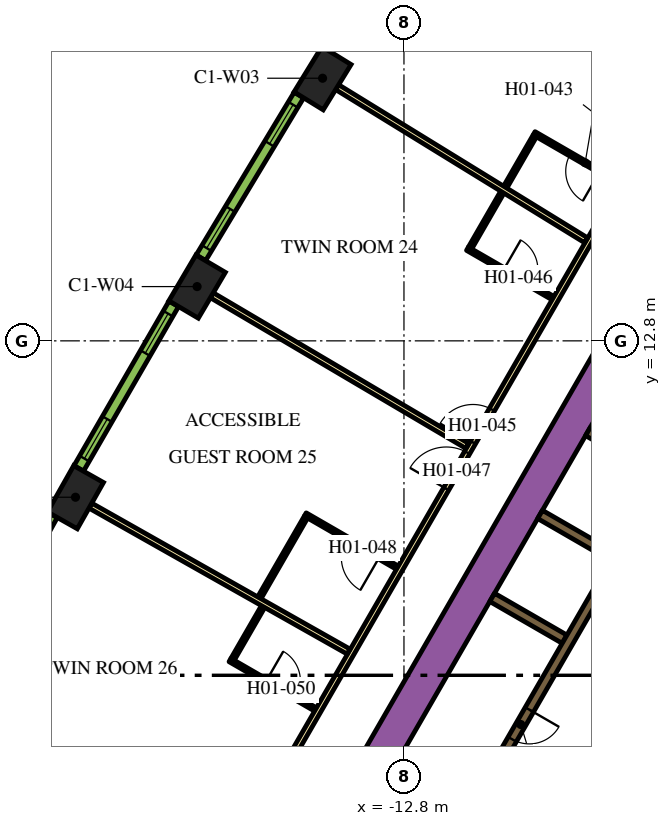
"""IFC4 building model, lengths in metres.
Left out: names, types, materials, properties, quantities, classifications, styles, units other than length and angle.
Written with IfcOpenShell. Run it as: python <this file> out.ifc"""

import sys

from ifc_helpers import new_model, si_unit, direction, frame, frame_2d, origin, origin_2d, place, context, subcontext, project, spatial, rectangle, extrude, element, fill, save


model = new_model("IFC4")
c1 = context("Model", 3, precision=1e-05, world=origin(), true_north=direction((0.0, 1.0)))
c2 = subcontext(c1, "Body", "Model", "MODEL_VIEW")
j1 = project(units=[si_unit("LENGTHUNIT", "METRE"), si_unit("PLANEANGLEUNIT", "RADIAN")], contexts=[c1])
p1 = place(None, origin())
s1 = spatial("IfcSite", under=j1, at=p1, CompositionType="ELEMENT")
p2 = place(p1, origin())
s2 = spatial("IfcBuilding", under=s1, at=p2, CompositionType="ELEMENT")
p3 = place(p2, frame((0.0, 0.0, 35.4)))
s3 = spatial("IfcBuildingStorey", under=s2, at=p3, CompositionType="ELEMENT", Elevation=35.4)
for number, where, z_axis, x_axis in (
    (1, (-14.942, 19.71, 0.0), (0.0, 0.0, 1.0), (-0.524, -0.852, 0.0)),
    (2, (-18.243, 14.228, 0.0), (0.0, 0.0, 1.0), (-0.508, -0.861, 0.0)),
    (3, (-21.443, 8.685, 0.0), (0.0, 0.0, 1.0), (-0.492, -0.871, 0.0)),
):
    element("IfcColumn", number, at=place(p3, frame(where, z_axis=z_axis, x_axis=x_axis)), inside=s3, PredefinedType="COLUMN", context=c2, shape_type="SweptSolid", body=[
        extrude(rectangle(XDim=1.4, YDim=0.9, at=origin_2d()), origin(), (0.0, 0.0, 1.0), 3.9),
    ])
p4 = place(p3, frame((-15.36, -1.503, 0.0), z_axis=(0.0, 0.0, 1.0), x_axis=(0.50000389221, 0.866023156604, 0.0)))
e4 = element("IfcWall", 4, at=p4, inside=s3, PredefinedType="SOLIDWALL", context=c2, shape_type="SweptSolid", body=[
    extrude(rectangle(XDim=21.0, YDim=0.9, at=frame_2d((10.5, 0.0))), origin(), (0.0, 0.0, 1.0), 3.9),
])
p5 = place(p3, frame((-8.06, -1.311, 0.0), z_axis=(0.0, 0.0, 1.0), x_axis=(0.50000273126, 0.866023826885, 0.0)))
e5 = element("IfcWall", 5, at=p5, inside=s3, PredefinedType="SOLIDWALL", context=c2, shape_type="SweptSolid", body=[
    extrude(rectangle(XDim=10.33, YDim=0.25, at=frame_2d((5.165, 0.0))), origin(), (0.0, 0.0, 1.0), 3.9),
])
for number, where, z_axis, x_axis in (
    (6, (-8.574, 4.95, 0.0), (0.0, 0.0, 1.0), (-0.866, 0.5, 0.0)),
    (7, (-7.314, 7.132, 0.0), (0.0, 0.0, 1.0), (-0.866, 0.5, 0.0)),
):
    element("IfcWall", number, at=place(p3, frame(where, z_axis=z_axis, x_axis=x_axis)), inside=s3, PredefinedType="SOLIDWALL", context=c2, shape_type="SweptSolid", body=[
        extrude(rectangle(XDim=2.2, YDim=0.25, at=frame_2d((1.1, 0.0))), origin(), (0.0, 0.0, 1.0), 3.9),
    ])
p6 = place(p3, frame((-7.959, 10.415, 0.0), z_axis=(0.0, 0.0, 1.0), x_axis=(0.866020958405, -0.500007699544, 0.0)))
e8 = element("IfcWall", 8, at=p6, inside=s3, PredefinedType="SOLIDWALL", context=c2, shape_type="SweptSolid", body=[
    extrude(rectangle(XDim=4.1, YDim=0.25, at=frame_2d((2.05, 0.0))), origin(), (0.0, 0.0, 1.0), 3.9),
])
p7 = place(p3, frame((-6.008, 9.144, 0.0), z_axis=(0.0, 0.0, 1.0), x_axis=(-0.500006956611, -0.866021387346, 0.0)))
e9 = element("IfcWall", 9, at=p7, inside=s3, PredefinedType="SOLIDWALL", context=c2, shape_type="SweptSolid", body=[
    extrude(rectangle(XDim=9.83, YDim=0.25, at=frame_2d((4.915, 0.0))), origin(), (0.0, 0.0, 1.0), 3.9),
])
p8 = place(p7, frame((6.985, 0.0, 0.0)))
e10 = element("IfcOpeningElement", 10, at=p8, cuts=e9, PredefinedType="OPENING", context=c2, shape_type="SweptSolid", body=[
    extrude(rectangle(XDim=0.9, YDim=2.1, at=frame_2d((0.45, 1.05))), frame((0.0, 0.135, 0.0), z_axis=(0.0, -1.0, 0.0), x_axis=(1.0, 0.0, 0.0)), (0.0, 0.0, 1.0), 0.27),
])
p9 = place(p3, frame((-19.081, -3.9, 0.0), z_axis=(0.0, 0.0, 1.0), x_axis=(0.499998313975, 0.866026377209, 0.0)))
e11 = element("IfcWall", 11, at=p9, inside=s3, PredefinedType="PARTITIONING", context=c2, shape_type="SweptSolid", body=[
    extrude(rectangle(XDim=25.766, YDim=0.15, at=frame_2d((12.883, 0.0))), origin(), (0.0, 0.0, 1.0), 2.75),
])
p10 = place(p9, frame((24.586, 0.0, 0.0)))
e12 = element("IfcOpeningElement", 12, at=p10, cuts=e11, PredefinedType="OPENING", context=c2, shape_type="SweptSolid", body=[
    extrude(rectangle(XDim=1.0, YDim=2.1, at=frame_2d((0.5, 1.05))), frame((0.0, 0.085, 0.0), z_axis=(0.0, -1.0, 0.0), x_axis=(1.0, 0.0, 0.0)), (0.0, 0.0, 1.0), 0.17),
])
p11 = place(p9, frame((16.196, 0.0, 0.0)))
e13 = element("IfcOpeningElement", 13, at=p11, cuts=e11, PredefinedType="OPENING", context=c2, shape_type="SweptSolid", body=[
    extrude(rectangle(XDim=1.0, YDim=2.1, at=frame_2d((0.5, 1.05))), frame((0.0, 0.085, 0.0), z_axis=(0.0, -1.0, 0.0), x_axis=(1.0, 0.0, 0.0)), (0.0, 0.0, 1.0), 0.17),
])
p12 = place(p9, frame((14.789, 0.0, 0.0)))
e14 = element("IfcOpeningElement", 14, at=p12, cuts=e11, PredefinedType="OPENING", context=c2, shape_type="SweptSolid", body=[
    extrude(rectangle(XDim=1.1, YDim=2.1, at=frame_2d((0.55, 1.05))), frame((0.0, 0.085, 0.0), z_axis=(0.0, -1.0, 0.0), x_axis=(1.0, 0.0, 0.0)), (0.0, 0.0, 1.0), 0.17),
])
p13 = place(p9, frame((3.698, 0.0, 0.0)))
e15 = element("IfcOpeningElement", 15, at=p13, cuts=e11, PredefinedType="OPENING", context=c2, shape_type="SweptSolid", body=[
    extrude(rectangle(XDim=1.0, YDim=2.1, at=frame_2d((0.5, 1.05))), frame((0.0, 0.085, 0.0), z_axis=(0.0, -1.0, 0.0), x_axis=(1.0, 0.0, 0.0)), (0.0, 0.0, 1.0), 0.17),
])
p14 = place(p9, frame((1.531, 0.0, 0.0)))
e16 = element("IfcOpeningElement", 16, at=p14, cuts=e11, PredefinedType="OPENING", context=c2, shape_type="SweptSolid", body=[
    extrude(rectangle(XDim=0.9, YDim=2.1, at=frame_2d((0.45, 1.05))), frame((0.0, 0.085, 0.0), z_axis=(0.0, -1.0, 0.0), x_axis=(1.0, 0.0, 0.0)), (0.0, 0.0, 1.0), 0.17),
])
p15 = place(p3, frame((-24.145, 2.871, 0.0), z_axis=(0.0, 0.0, 1.0), x_axis=(0.879551725039, -0.475803281809, 0.0)))
e17 = element("IfcWall", 17, at=p15, inside=s3, PredefinedType="PARTITIONING", context=c2, shape_type="SweptSolid", body=[
    extrude(rectangle(XDim=7.688, YDim=0.15, at=frame_2d((3.844, 0.0))), origin(), (0.0, 0.0, 1.0), 2.75),
])
p16 = place(p3, frame((-21.052, 8.464, 0.0), z_axis=(0.0, 0.0, 1.0), x_axis=(0.87059371954, -0.492002617368, 0.0)))
e18 = element("IfcWall", 18, at=p16, inside=s3, PredefinedType="PARTITIONING", context=c2, shape_type="SweptSolid", body=[
    extrude(rectangle(XDim=7.803, YDim=0.15, at=frame_2d((3.902, 0.0))), origin(), (0.0, 0.0, 1.0), 2.75),
])
p17 = place(p3, frame((-17.856, 13.999, 0.0), z_axis=(0.0, 0.0, 1.0), x_axis=(0.861371519381, -0.507975497047, 0.0)))
e19 = element("IfcWall", 19, at=p17, inside=s3, PredefinedType="PARTITIONING", context=c2, shape_type="SweptSolid", body=[
    extrude(rectangle(XDim=7.804, YDim=0.15, at=frame_2d((3.902, 0.0))), origin(), (0.0, 0.0, 1.0), 2.75),
])
p18 = place(p3, frame((-14.558, 19.475, 0.0), z_axis=(0.0, 0.0, 1.0), x_axis=(0.851829455142, -0.523819223925, 0.0)))
e20 = element("IfcWall", 20, at=p18, inside=s3, PredefinedType="PARTITIONING", context=c2, shape_type="SweptSolid", body=[
    extrude(rectangle(XDim=7.688, YDim=0.15, at=frame_2d((3.844, 0.0))), origin(), (0.0, 0.0, 1.0), 2.75),
])
p19 = place(p3, frame((-11.16, 24.888, 0.0), z_axis=(0.0, 0.0, 1.0), x_axis=(0.84199813156, -0.539480441211, 0.0)))
e21 = element("IfcWall", 21, at=p19, inside=s3, PredefinedType="PARTITIONING", context=c2, shape_type="SweptSolid", body=[
    extrude(rectangle(XDim=11.638, YDim=0.15, at=frame_2d((5.819, 0.0))), origin(), (0.0, 0.0, 1.0), 2.75),
])
p20 = place(p3, frame((-7.124, 16.961, 0.0), z_axis=(0.0, 0.0, 1.0), x_axis=(-0.866021400173, 0.500006934395, 0.0)))
e22 = element("IfcWall", 22, at=p20, inside=s3, PredefinedType="PARTITIONING", context=c2, shape_type="SweptSolid", body=[
    extrude(rectangle(XDim=2.6, YDim=0.1, at=frame_2d((1.3, 0.0))), origin(), (0.0, 0.0, 1.0), 2.75),
])
p21 = place(p20, frame((0.6, 0.0, 0.0)))
e23 = element("IfcOpeningElement", 23, at=p21, cuts=e22, PredefinedType="OPENING", context=c2, shape_type="SweptSolid", body=[
    extrude(rectangle(XDim=0.9, YDim=2.1, at=frame_2d((0.45, 1.05))), frame((0.0, 0.06, 0.0), z_axis=(0.0, -1.0, 0.0), x_axis=(1.0, 0.0, 0.0)), (0.0, 0.0, 1.0), 0.12),
])
p22 = place(p3, frame((-9.362, 18.184, 0.0), z_axis=(0.0, 0.0, 1.0), x_axis=(-0.499992328818, -0.866029832698, 0.0)))
e24 = element("IfcWall", 24, at=p22, inside=s3, PredefinedType="PARTITIONING", context=c2, shape_type="SweptSolid", body=[
    extrude(rectangle(XDim=1.54, YDim=0.1, at=frame_2d((0.77, 0.0))), origin(), (0.0, 0.0, 1.0), 2.75),
])
p23 = place(p3, frame((-11.129, 15.224, 0.0), z_axis=(0.0, 0.0, 1.0), x_axis=(0.866021400173, -0.500006934395, 0.0)))
e25 = element("IfcWall", 25, at=p23, inside=s3, PredefinedType="PARTITIONING", context=c2, shape_type="SweptSolid", body=[
    extrude(rectangle(XDim=2.6, YDim=0.1, at=frame_2d((1.3, 0.0))), origin(), (0.0, 0.0, 1.0), 2.75),
])
p24 = place(p23, frame((1.1, 0.0, 0.0)))
e26 = element("IfcOpeningElement", 26, at=p24, cuts=e25, PredefinedType="OPENING", context=c2, shape_type="SweptSolid", body=[
    extrude(rectangle(XDim=0.9, YDim=2.1, at=frame_2d((0.45, 1.05))), frame((0.0, 0.06, 0.0), z_axis=(0.0, -1.0, 0.0), x_axis=(1.0, 0.0, 0.0)), (0.0, 0.0, 1.0), 0.12),
])
p25 = place(p3, frame((-11.061, 15.242, 0.0), z_axis=(0.0, 0.0, 1.0), x_axis=(0.499976720371, 0.866038843867, 0.0)))
e27 = element("IfcWall", 27, at=p25, inside=s3, PredefinedType="PARTITIONING", context=c2, shape_type="SweptSolid", body=[
    extrude(rectangle(XDim=1.69, YDim=0.1, at=frame_2d((0.845, 0.0))), origin(), (0.0, 0.0, 1.0), 2.75),
])
p26 = place(p3, frame((-12.972, 6.831, 0.0), z_axis=(0.0, 0.0, 1.0), x_axis=(-0.866018616679, 0.500011755427, 0.0)))
e28 = element("IfcWall", 28, at=p26, inside=s3, PredefinedType="PARTITIONING", context=c2, shape_type="SweptSolid", body=[
    extrude(rectangle(XDim=2.8, YDim=0.1, at=frame_2d((1.4, 0.0))), origin(), (0.0, 0.0, 1.0), 2.75),
])
p27 = place(p26, frame((0.55, 0.0, 0.0)))
e29 = element("IfcOpeningElement", 29, at=p27, cuts=e28, PredefinedType="OPENING", context=c2, shape_type="SweptSolid", body=[
    extrude(rectangle(XDim=1.0, YDim=2.1, at=frame_2d((0.5, 1.05))), frame((0.0, 0.06, 0.0), z_axis=(0.0, -1.0, 0.0), x_axis=(1.0, 0.0, 0.0)), (0.0, 0.0, 1.0), 0.12),
])
p28 = place(p3, frame((-15.379, 8.163, 0.0), z_axis=(0.0, 0.0, 1.0), x_axis=(-0.499987006516, -0.866032905446, 0.0)))
e30 = element("IfcWall", 30, at=p28, inside=s3, PredefinedType="PARTITIONING", context=c2, shape_type="SweptSolid", body=[
    extrude(rectangle(XDim=2.45, YDim=0.1, at=frame_2d((1.225, 0.0))), origin(), (0.0, 0.0, 1.0), 2.75),
])
p29 = place(p3, frame((-17.378, 4.401, 0.0), z_axis=(0.0, 0.0, 1.0), x_axis=(0.865997922154, -0.500047596559, 0.0)))
e31 = element("IfcWall", 31, at=p29, inside=s3, PredefinedType="PARTITIONING", context=c2, shape_type="SweptSolid", body=[
    extrude(rectangle(XDim=2.6, YDim=0.1, at=frame_2d((1.3, 0.0))), origin(), (0.0, 0.0, 1.0), 2.75),
])
p30 = place(p29, frame((1.1, 0.0, 0.0)))
e32 = element("IfcOpeningElement", 32, at=p30, cuts=e31, PredefinedType="OPENING", context=c2, shape_type="SweptSolid", body=[
    extrude(rectangle(XDim=0.9, YDim=2.1, at=frame_2d((0.45, 1.05))), frame((0.0, 0.06, 0.0), z_axis=(0.0, -1.0, 0.0), x_axis=(1.0, 0.0, 0.0)), (0.0, 0.0, 1.0), 0.12),
])
p31 = place(p3, frame((-17.309, 4.419, 0.0), z_axis=(0.0, 0.0, 1.0), x_axis=(0.499880961361, 0.866094119867, 0.0)))
e33 = element("IfcWall", 33, at=p31, inside=s3, PredefinedType="PARTITIONING", context=c2, shape_type="SweptSolid", body=[
    extrude(rectangle(XDim=1.6, YDim=0.1, at=frame_2d((0.8, 0.0))), origin(), (0.0, 0.0, 1.0), 2.75),
])
p32 = place(p3, frame((-12.17, 24.699, 0.0), z_axis=(0.0, 0.0, 1.0), x_axis=(-0.531688286542, -0.846940119462, 0.0)))
e34 = element("IfcWall", 34, at=p32, inside=s3, PredefinedType="SOLIDWALL", context=c2, shape_type="SweptSolid", body=[
    extrude(rectangle(XDim=4.998, YDim=0.29, at=frame_2d((2.499, 0.0))), origin(), (0.0, 0.0, 1.0), 3.65),
])
p33 = place(p32, frame((0.297, 0.0, 0.9)))
e35 = element("IfcOpeningElement", 35, at=p33, cuts=e34, PredefinedType="OPENING", context=c2, shape_type="SweptSolid", body=[
    extrude(rectangle(XDim=1.2, YDim=2.15, at=frame_2d((0.6, 1.075))), frame((0.0, 0.155, 0.0), z_axis=(0.0, -1.0, 0.0), x_axis=(1.0, 0.0, 0.0)), (0.0, 0.0, 1.0), 0.31),
])
p34 = place(p32, frame((3.501, 0.0, 0.9)))
e36 = element("IfcOpeningElement", 36, at=p34, cuts=e34, PredefinedType="OPENING", context=c2, shape_type="SweptSolid", body=[
    extrude(rectangle(XDim=1.2, YDim=2.15, at=frame_2d((0.6, 1.075))), frame((0.0, 0.155, 0.0), z_axis=(0.0, -1.0, 0.0), x_axis=(1.0, 0.0, 0.0)), (0.0, 0.0, 1.0), 0.31),
])
p35 = place(p3, frame((-15.564, 19.267, 0.0), z_axis=(0.0, 0.0, 1.0), x_axis=(-0.515938796285, -0.856625448191, 0.0)))
e37 = element("IfcWall", 37, at=p35, inside=s3, PredefinedType="SOLIDWALL", context=c2, shape_type="SweptSolid", body=[
    extrude(rectangle(XDim=4.998, YDim=0.29, at=frame_2d((2.499, 0.0))), origin(), (0.0, 0.0, 1.0), 3.65),
])
p36 = place(p35, frame((0.297, 0.0, 0.9)))
e38 = element("IfcOpeningElement", 38, at=p36, cuts=e37, PredefinedType="OPENING", context=c2, shape_type="SweptSolid", body=[
    extrude(rectangle(XDim=1.2, YDim=2.15, at=frame_2d((0.6, 1.075))), frame((0.0, 0.155, 0.0), z_axis=(0.0, -1.0, 0.0), x_axis=(1.0, 0.0, 0.0)), (0.0, 0.0, 1.0), 0.31),
])
p37 = place(p35, frame((3.501, 0.0, 0.9)))
e39 = element("IfcOpeningElement", 39, at=p37, cuts=e37, PredefinedType="OPENING", context=c2, shape_type="SweptSolid", body=[
    extrude(rectangle(XDim=1.2, YDim=2.15, at=frame_2d((0.6, 1.075))), frame((0.0, 0.155, 0.0), z_axis=(0.0, -1.0, 0.0), x_axis=(1.0, 0.0, 0.0)), (0.0, 0.0, 1.0), 0.31),
])
p38 = place(p3, frame((-18.858, 13.773, 0.0), z_axis=(0.0, 0.0, 1.0), x_axis=(-0.50002123722, -0.866013142123, 0.0)))
e40 = element("IfcWall", 40, at=p38, inside=s3, PredefinedType="SOLIDWALL", context=c2, shape_type="SweptSolid", body=[
    extrude(rectangle(XDim=4.998, YDim=0.29, at=frame_2d((2.499, 0.0))), origin(), (0.0, 0.0, 1.0), 3.65),
])
p39 = place(p38, frame((0.297, 0.0, 0.9)))
e41 = element("IfcOpeningElement", 41, at=p39, cuts=e40, PredefinedType="OPENING", context=c2, shape_type="SweptSolid", body=[
    extrude(rectangle(XDim=1.2, YDim=2.15, at=frame_2d((0.6, 1.075))), frame((0.0, 0.155, 0.0), z_axis=(0.0, -1.0, 0.0), x_axis=(1.0, 0.0, 0.0)), (0.0, 0.0, 1.0), 0.31),
])
p40 = place(p38, frame((3.501, 0.0, 0.9)))
e42 = element("IfcOpeningElement", 42, at=p40, cuts=e40, PredefinedType="OPENING", context=c2, shape_type="SweptSolid", body=[
    extrude(rectangle(XDim=1.2, YDim=2.15, at=frame_2d((0.6, 1.075))), frame((0.0, 0.155, 0.0), z_axis=(0.0, -1.0, 0.0), x_axis=(1.0, 0.0, 0.0)), (0.0, 0.0, 1.0), 0.31),
])
p41 = place(p3, frame((-22.05, 8.22, 0.0), z_axis=(0.0, 0.0, 1.0), x_axis=(-0.483912572871, -0.875116347589, 0.0)))
e43 = element("IfcWall", 43, at=p41, inside=s3, PredefinedType="SOLIDWALL", context=c2, shape_type="SweptSolid", body=[
    extrude(rectangle(XDim=4.998, YDim=0.29, at=frame_2d((2.499, 0.0))), origin(), (0.0, 0.0, 1.0), 3.65),
])
p42 = place(p41, frame((0.297, 0.0, 0.9)))
e44 = element("IfcOpeningElement", 44, at=p42, cuts=e43, PredefinedType="OPENING", context=c2, shape_type="SweptSolid", body=[
    extrude(rectangle(XDim=1.2, YDim=2.15, at=frame_2d((0.6, 1.075))), frame((0.0, 0.155, 0.0), z_axis=(0.0, -1.0, 0.0), x_axis=(1.0, 0.0, 0.0)), (0.0, 0.0, 1.0), 0.31),
])
p43 = place(p41, frame((3.501, 0.0, 0.9)))
e45 = element("IfcOpeningElement", 45, at=p43, cuts=e43, PredefinedType="OPENING", context=c2, shape_type="SweptSolid", body=[
    extrude(rectangle(XDim=1.2, YDim=2.15, at=frame_2d((0.6, 1.075))), frame((0.0, 0.155, 0.0), z_axis=(0.0, -1.0, 0.0), x_axis=(1.0, 0.0, 0.0)), (0.0, 0.0, 1.0), 0.31),
])
p44 = place(p8, origin())
e46 = element("IfcDoor", 46, at=p44, inside=s3, OperationType="SINGLE_SWING_LEFT", PredefinedType="DOOR", context=c2, shape_type="SweptSolid", body=[
    extrude(rectangle(XDim=0.9, YDim=2.1, at=frame_2d((0.45, 1.05))), frame((0.0, 0.025, 0.0), z_axis=(0.0, -1.0, 0.0), x_axis=(1.0, 0.0, 0.0)), (0.0, 0.0, 1.0), 0.05),
])
fill(e10, e46)
p45 = place(p21, origin())
e47 = element("IfcDoor", 47, at=p45, inside=s3, OperationType="SINGLE_SWING_LEFT", PredefinedType="DOOR", context=c2, shape_type="SweptSolid", body=[
    extrude(rectangle(XDim=0.9, YDim=2.1, at=frame_2d((0.45, 1.05))), frame((0.0, 0.025, 0.0), z_axis=(0.0, -1.0, 0.0), x_axis=(1.0, 0.0, 0.0)), (0.0, 0.0, 1.0), 0.05),
])
fill(e23, e47)
p46 = place(p11, origin())
e48 = element("IfcDoor", 48, at=p46, inside=s3, OperationType="SINGLE_SWING_LEFT", PredefinedType="DOOR", context=c2, shape_type="SweptSolid", body=[
    extrude(rectangle(XDim=1.0, YDim=2.1, at=frame_2d((0.5, 1.05))), frame((0.0, 0.025, 0.0), z_axis=(0.0, -1.0, 0.0), x_axis=(1.0, 0.0, 0.0)), (0.0, 0.0, 1.0), 0.05),
])
fill(e13, e48)
p47 = place(p24, origin())
e49 = element("IfcDoor", 49, at=p47, inside=s3, OperationType="SINGLE_SWING_RIGHT", PredefinedType="DOOR", context=c2, shape_type="SweptSolid", body=[
    extrude(rectangle(XDim=0.9, YDim=2.1, at=frame_2d((0.45, 1.05))), frame((0.0, 0.025, 0.0), z_axis=(0.0, -1.0, 0.0), x_axis=(1.0, 0.0, 0.0)), (0.0, 0.0, 1.0), 0.05),
])
fill(e26, e49)
p48 = place(p12, origin())
e50 = element("IfcDoor", 50, at=p48, inside=s3, OperationType="SINGLE_SWING_RIGHT", PredefinedType="DOOR", context=c2, shape_type="SweptSolid", body=[
    extrude(rectangle(XDim=1.1, YDim=2.1, at=frame_2d((0.55, 1.05))), frame((0.0, 0.025, 0.0), z_axis=(0.0, -1.0, 0.0), x_axis=(1.0, 0.0, 0.0)), (0.0, 0.0, 1.0), 0.05),
])
fill(e14, e50)
p49 = place(p27, origin())
e51 = element("IfcDoor", 51, at=p49, inside=s3, OperationType="SINGLE_SWING_LEFT", PredefinedType="DOOR", context=c2, shape_type="SweptSolid", body=[
    extrude(rectangle(XDim=1.0, YDim=2.1, at=frame_2d((0.5, 1.05))), frame((0.0, 0.025, 0.0), z_axis=(0.0, -1.0, 0.0), x_axis=(1.0, 0.0, 0.0)), (0.0, 0.0, 1.0), 0.05),
])
fill(e29, e51)
p50 = place(p30, origin())
e52 = element("IfcDoor", 52, at=p50, inside=s3, OperationType="SINGLE_SWING_LEFT", PredefinedType="DOOR", context=c2, shape_type="SweptSolid", body=[
    extrude(rectangle(XDim=0.9, YDim=2.1, at=frame_2d((0.45, 1.05))), frame((0.0, 0.025, 0.0), z_axis=(0.0, -1.0, 0.0), x_axis=(1.0, 0.0, 0.0)), (0.0, 0.0, 1.0), 0.05),
])
fill(e32, e52)
p51 = place(p36, origin())
e53 = element("IfcWindow", 53, at=p51, inside=s3, PartitioningType="DOUBLE_PANEL_VERTICAL", PredefinedType="WINDOW", context=c2, shape_type="SweptSolid", body=[
    extrude(rectangle(XDim=1.2, YDim=2.15, at=frame_2d((0.6, 1.075))), frame((0.0, 0.015, 0.0), z_axis=(0.0, -1.0, 0.0), x_axis=(1.0, 0.0, 0.0)), (0.0, 0.0, 1.0), 0.06),
])
fill(e38, e53)
p52 = place(p37, origin())
e54 = element("IfcWindow", 54, at=p52, inside=s3, PartitioningType="DOUBLE_PANEL_VERTICAL", PredefinedType="WINDOW", context=c2, shape_type="SweptSolid", body=[
    extrude(rectangle(XDim=1.2, YDim=2.15, at=frame_2d((0.6, 1.075))), frame((0.0, 0.015, 0.0), z_axis=(0.0, -1.0, 0.0), x_axis=(1.0, 0.0, 0.0)), (0.0, 0.0, 1.0), 0.06),
])
fill(e39, e54)
p53 = place(p39, origin())
e55 = element("IfcWindow", 55, at=p53, inside=s3, PartitioningType="DOUBLE_PANEL_VERTICAL", PredefinedType="WINDOW", context=c2, shape_type="SweptSolid", body=[
    extrude(rectangle(XDim=1.2, YDim=2.15, at=frame_2d((0.6, 1.075))), frame((0.0, 0.015, 0.0), z_axis=(0.0, -1.0, 0.0), x_axis=(1.0, 0.0, 0.0)), (0.0, 0.0, 1.0), 0.06),
])
fill(e41, e55)
p54 = place(p40, origin())
e56 = element("IfcWindow", 56, at=p54, inside=s3, PartitioningType="DOUBLE_PANEL_VERTICAL", PredefinedType="WINDOW", context=c2, shape_type="SweptSolid", body=[
    extrude(rectangle(XDim=1.2, YDim=2.15, at=frame_2d((0.6, 1.075))), frame((0.0, 0.015, 0.0), z_axis=(0.0, -1.0, 0.0), x_axis=(1.0, 0.0, 0.0)), (0.0, 0.0, 1.0), 0.06),
])
fill(e42, e56)
save(model, sys.argv[1])
